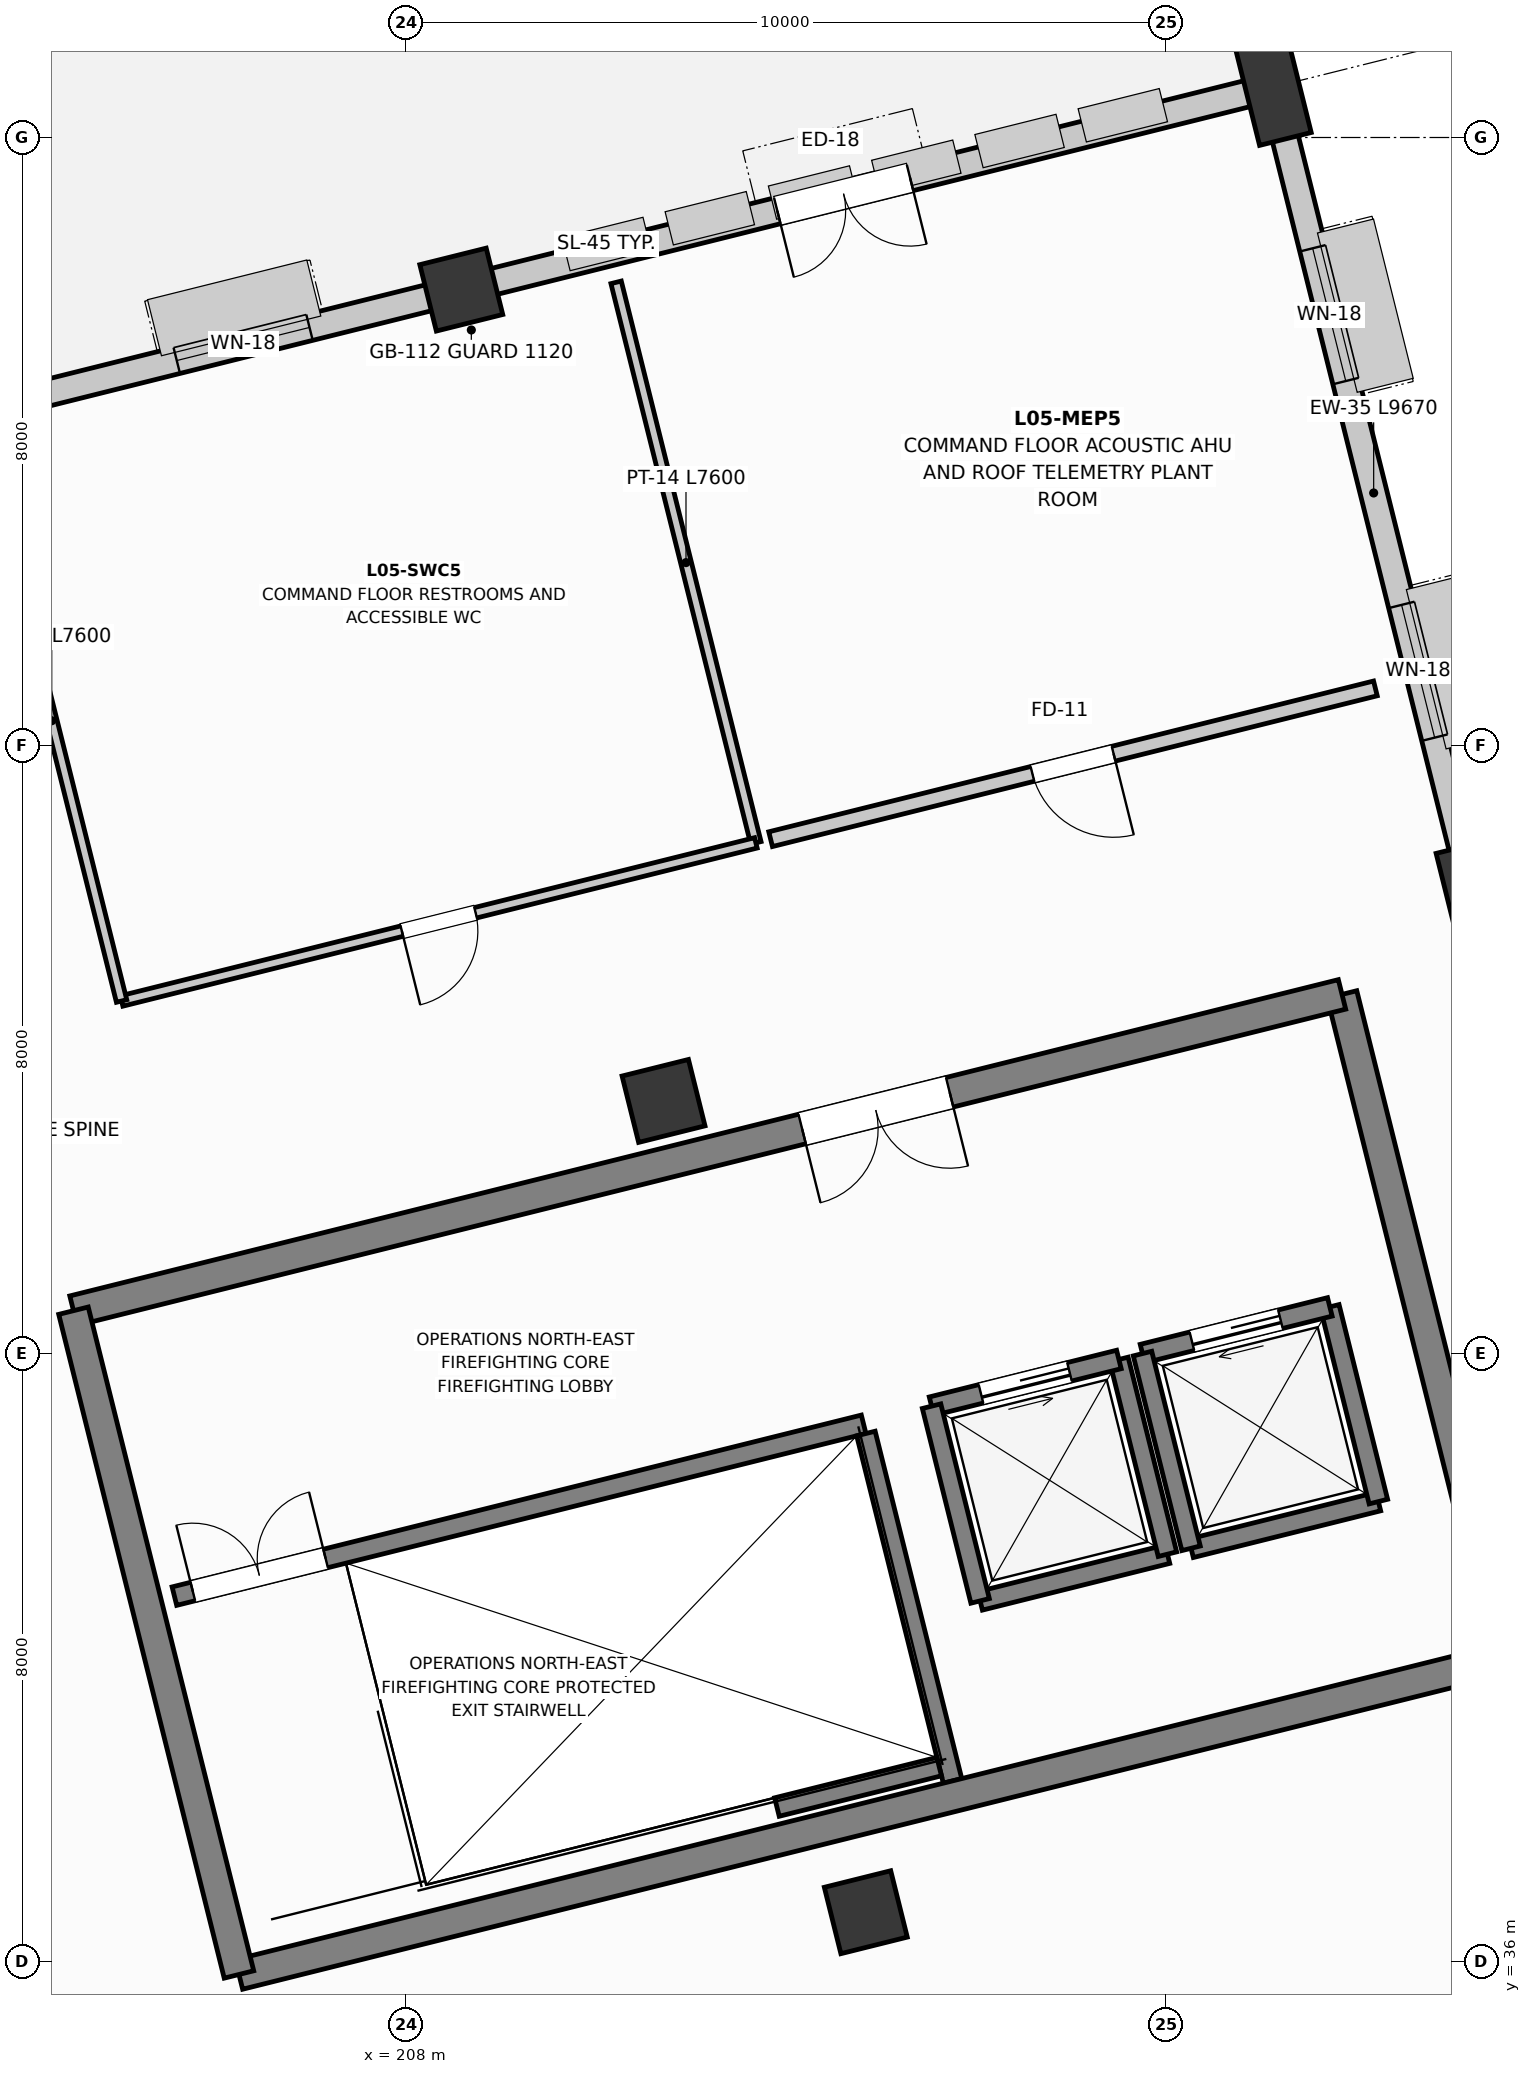
"""IFC4 building model, lengths in metres.
Left out: names, types, materials, properties, quantities, classifications, styles, units other than length and angle.
Written with IfcOpenShell. Run it as: python <this file> out.ifc"""

import sys

from ifc_helpers import new_model, si_unit, direction, frame, frame_2d, origin, origin_2d, place, context, subcontext, project, spatial, rectangle, extrude, element, fill, save


model = new_model("IFC4")
c1 = context("Model", 3, precision=1e-05, world=origin(), true_north=direction((0.0, 1.0)))
c2 = subcontext(c1, "Body", "Model", "MODEL_VIEW")
j1 = project(units=[si_unit("LENGTHUNIT", "METRE"), si_unit("PLANEANGLEUNIT", "RADIAN")], contexts=[c1])
p1 = place(None, origin())
s1 = spatial("IfcSite", under=j1, at=p1, CompositionType="ELEMENT")
p2 = place(p1, origin())
s2 = spatial("IfcBuilding", under=s1, at=p2, CompositionType="ELEMENT")
p3 = place(p2, frame((0.0, 0.0, 24.6)))
s3 = spatial("IfcBuildingStorey", under=s2, at=p3, CompositionType="ELEMENT", Elevation=24.6)
for number, where, z_axis, x_axis in (
    (1, (214.044, 36.652, 0.0), (0.0, 0.0, 1.0), (0.97, 0.242, 0.0)),
    (2, (211.383, 47.325, 0.0), (0.0, 0.0, 1.0), (0.97, 0.242, 0.0)),
    (3, (208.722, 57.999, 0.0), (0.0, 0.0, 1.0), (0.97, 0.242, 0.0)),
):
    element("IfcColumn", number, at=place(p3, frame(where, z_axis=z_axis, x_axis=x_axis)), inside=s3, PredefinedType="COLUMN", context=c2, shape_type="SweptSolid", body=[
        extrude(rectangle(XDim=0.9, YDim=0.9, at=origin_2d()), origin(), (0.0, 0.0, 1.0), 4.2),
    ])
for number, where, z_axis, x_axis in (
    (4, (222.056, 49.987, 0.0), (0.0, 0.0, 1.0), (0.97, 0.242, 0.0)),
    (5, (219.395, 60.66, 0.0), (0.0, 0.0, 1.0), (0.97, 0.242, 0.0)),
):
    element("IfcColumn", number, at=place(p3, frame(where, z_axis=z_axis, x_axis=x_axis)), inside=s3, PredefinedType="COLUMN", context=c2, shape_type="SweptSolid", body=[
        extrude(rectangle(XDim=0.7, YDim=1.4, at=origin_2d()), origin(), (0.0, 0.0, 1.0), 4.2),
    ])
p4 = place(p3, frame((221.895, 50.632, 0.0), z_axis=(0.0, 0.0, 1.0), x_axis=(-0.241910213289, 0.970298638929, 0.0)))
e6 = element("IfcWall", 6, at=p4, inside=s3, PredefinedType="STANDARD", context=c2, shape_type="SweptSolid", body=[
    extrude(rectangle(XDim=9.67, YDim=0.35, at=frame_2d((4.835, 0.0))), origin(), (0.0, 0.0, 1.0), 3.575),
])
p5 = place(p4, frame((1.517, 0.0, 0.85)))
e7 = element("IfcOpeningElement", 7, at=p5, cuts=e6, PredefinedType="OPENING", context=c2, shape_type="SweptSolid", body=[
    extrude(rectangle(XDim=1.8, YDim=1.65, at=frame_2d((0.9, 0.825))), frame((0.0, 0.185, 0.0), z_axis=(0.0, -1.0, 0.0), x_axis=(1.0, 0.0, 0.0)), (0.0, 0.0, 1.0), 0.37),
])
p6 = place(p4, frame((6.352, 0.0, 0.85)))
e8 = element("IfcOpeningElement", 8, at=p6, cuts=e6, PredefinedType="OPENING", context=c2, shape_type="SweptSolid", body=[
    extrude(rectangle(XDim=1.8, YDim=1.65, at=frame_2d((0.9, 0.825))), frame((0.0, 0.185, 0.0), z_axis=(0.0, -1.0, 0.0), x_axis=(1.0, 0.0, 0.0)), (0.0, 0.0, 1.0), 0.37),
])
p7 = place(p3, frame((219.089, 60.584, 0.0), z_axis=(0.0, 0.0, 1.0), x_axis=(-0.970295240562, -0.241923843686, 0.0)))
e9 = element("IfcWall", 9, at=p7, inside=s3, PredefinedType="STANDARD", context=c2, shape_type="SweptSolid", body=[
    extrude(rectangle(XDim=10.27, YDim=0.35, at=frame_2d((5.135, 0.0))), origin(), (0.0, 0.0, 1.0), 3.575),
])
p8 = place(p7, frame((4.6, 0.0, 0.0)))
e10 = element("IfcOpeningElement", 10, at=p8, cuts=e9, PredefinedType="OPENING", context=c2, shape_type="SweptSolid", body=[
    extrude(rectangle(XDim=1.8, YDim=2.3, at=frame_2d((0.9, 1.15))), frame((0.0, 0.185, 0.0), z_axis=(0.0, -1.0, 0.0), x_axis=(1.0, 0.0, 0.0)), (0.0, 0.0, 1.0), 0.37),
])
p9 = place(p3, frame((208.319, 57.898, 0.0), z_axis=(0.0, 0.0, 1.0), x_axis=(-0.970296149297, -0.241920198949, 0.0)))
e11 = element("IfcWall", 11, at=p9, inside=s3, PredefinedType="STANDARD", context=c2, shape_type="SweptSolid", body=[
    extrude(rectangle(XDim=10.171, YDim=0.35, at=frame_2d((5.085, 0.0))), origin(), (0.0, 0.0, 1.0), 3.575),
])
p10 = place(p9, frame((1.643, 0.0, 0.85)))
e12 = element("IfcOpeningElement", 12, at=p10, cuts=e11, PredefinedType="OPENING", context=c2, shape_type="SweptSolid", body=[
    extrude(rectangle(XDim=1.8, YDim=1.65, at=frame_2d((0.9, 0.825))), frame((0.0, 0.185, 0.0), z_axis=(0.0, -1.0, 0.0), x_axis=(1.0, 0.0, 0.0)), (0.0, 0.0, 1.0), 0.37),
])
p11 = place(p9, frame((6.728, 0.0, 0.85)))
e13 = element("IfcOpeningElement", 13, at=p11, cuts=e11, PredefinedType="OPENING", context=c2, shape_type="SweptSolid", body=[
    extrude(rectangle(XDim=1.8, YDim=1.65, at=frame_2d((0.9, 0.825))), frame((0.0, 0.185, 0.0), z_axis=(0.0, -1.0, 0.0), x_axis=(1.0, 0.0, 0.0)), (0.0, 0.0, 1.0), 0.37),
])
p12 = place(p3, frame((200.81, 44.261, 0.0), z_axis=(0.0, 0.0, 1.0), x_axis=(0.241915507725, -0.97029731893, 0.0)))
e14 = element("IfcWall", 14, at=p12, inside=s3, PredefinedType="STANDARD", context=c2, shape_type="SweptSolid", body=[
    extrude(rectangle(XDim=10.17, YDim=0.35, at=frame_2d((5.085, 0.0))), origin(), (0.0, 0.0, 1.0), 3.225),
])
p13 = place(p12, frame((1.642, 0.0, 0.85)))
e15 = element("IfcOpeningElement", 15, at=p13, cuts=e14, PredefinedType="OPENING", context=c2, shape_type="SweptSolid", body=[
    extrude(rectangle(XDim=1.8, YDim=1.65, at=frame_2d((0.9, 0.825))), frame((0.0, 0.185, 0.0), z_axis=(0.0, -1.0, 0.0), x_axis=(1.0, 0.0, 0.0)), (0.0, 0.0, 1.0), 0.37),
])
p14 = place(p12, frame((6.727, 0.0, 0.85)))
e16 = element("IfcOpeningElement", 16, at=p14, cuts=e14, PredefinedType="OPENING", context=c2, shape_type="SweptSolid", body=[
    extrude(rectangle(XDim=1.8, YDim=1.65, at=frame_2d((0.9, 0.825))), frame((0.0, 0.185, 0.0), z_axis=(0.0, -1.0, 0.0), x_axis=(1.0, 0.0, 0.0)), (0.0, 0.0, 1.0), 0.37),
])
p15 = place(p3, frame((215.548, 40.748, 0.0), z_axis=(0.0, 0.0, 1.0), x_axis=(0.97029284861, 0.241933436994, 0.0)))
e17 = element("IfcWall", 17, at=p15, inside=s3, PredefinedType="SOLIDWALL", context=c2, shape_type="SweptSolid", body=[
    extrude(rectangle(XDim=2.54, YDim=0.25, at=frame_2d((1.27, 0.0))), origin(), (0.0, 0.0, 1.0), 3.98),
])
p16 = place(p3, frame((218.012, 41.362, 0.0), z_axis=(0.0, 0.0, 1.0), x_axis=(-0.241938414856, 0.970291607413, 0.0)))
e18 = element("IfcWall", 18, at=p16, inside=s3, PredefinedType="SOLIDWALL", context=c2, shape_type="SweptSolid", body=[
    extrude(rectangle(XDim=2.64, YDim=0.25, at=frame_2d((1.32, 0.0))), origin(), (0.0, 0.0, 1.0), 3.98),
])
p17 = place(p3, frame((217.374, 43.924, 0.0), z_axis=(0.0, 0.0, 1.0), x_axis=(-0.97029284861, -0.241933436994, 0.0)))
e19 = element("IfcWall", 19, at=p17, inside=s3, PredefinedType="SOLIDWALL", context=c2, shape_type="SweptSolid", body=[
    extrude(rectangle(XDim=2.54, YDim=0.25, at=frame_2d((1.27, 0.0))), origin(), (0.0, 0.0, 1.0), 3.98),
])
p18 = place(p17, frame((0.67, 0.0, 0.0)))
e20 = element("IfcOpeningElement", 20, at=p18, cuts=e19, PredefinedType="OPENING", context=c2, shape_type="SweptSolid", body=[
    extrude(rectangle(XDim=1.2, YDim=2.2, at=frame_2d((0.6, 1.1))), frame((0.0, 0.135, 0.0), z_axis=(0.0, -1.0, 0.0), x_axis=(1.0, 0.0, 0.0)), (0.0, 0.0, 1.0), 0.27),
])
p19 = place(p3, frame((214.909, 43.309, 0.0), z_axis=(0.0, 0.0, 1.0), x_axis=(0.241938414856, -0.970291607413, 0.0)))
e21 = element("IfcWall", 21, at=p19, inside=s3, PredefinedType="SOLIDWALL", context=c2, shape_type="SweptSolid", body=[
    extrude(rectangle(XDim=2.64, YDim=0.25, at=frame_2d((1.32, 0.0))), origin(), (0.0, 0.0, 1.0), 3.98),
])
p20 = place(p3, frame((218.323, 41.44, 0.0), z_axis=(0.0, 0.0, 1.0), x_axis=(0.97029284861, 0.241933436994, 0.0)))
e22 = element("IfcWall", 22, at=p20, inside=s3, PredefinedType="SOLIDWALL", context=c2, shape_type="SweptSolid", body=[
    extrude(rectangle(XDim=2.54, YDim=0.25, at=frame_2d((1.27, 0.0))), origin(), (0.0, 0.0, 1.0), 3.98),
])
p21 = place(p3, frame((220.787, 42.054, 0.0), z_axis=(0.0, 0.0, 1.0), x_axis=(-0.241938414856, 0.970291607413, 0.0)))
e23 = element("IfcWall", 23, at=p21, inside=s3, PredefinedType="SOLIDWALL", context=c2, shape_type="SweptSolid", body=[
    extrude(rectangle(XDim=2.64, YDim=0.25, at=frame_2d((1.32, 0.0))), origin(), (0.0, 0.0, 1.0), 3.98),
])
p22 = place(p3, frame((220.149, 44.616, 0.0), z_axis=(0.0, 0.0, 1.0), x_axis=(-0.97029284861, -0.241933436994, 0.0)))
e24 = element("IfcWall", 24, at=p22, inside=s3, PredefinedType="SOLIDWALL", context=c2, shape_type="SweptSolid", body=[
    extrude(rectangle(XDim=2.54, YDim=0.25, at=frame_2d((1.27, 0.0))), origin(), (0.0, 0.0, 1.0), 3.98),
])
p23 = place(p22, frame((0.67, 0.0, 0.0)))
e25 = element("IfcOpeningElement", 25, at=p23, cuts=e24, PredefinedType="OPENING", context=c2, shape_type="SweptSolid", body=[
    extrude(rectangle(XDim=1.2, YDim=2.2, at=frame_2d((0.6, 1.1))), frame((0.0, 0.135, 0.0), z_axis=(0.0, -1.0, 0.0), x_axis=(1.0, 0.0, 0.0)), (0.0, 0.0, 1.0), 0.27),
])
p24 = place(p3, frame((217.684, 44.001, 0.0), z_axis=(0.0, 0.0, 1.0), x_axis=(0.241938414856, -0.970291607413, 0.0)))
e26 = element("IfcWall", 26, at=p24, inside=s3, PredefinedType="SOLIDWALL", context=c2, shape_type="SweptSolid", body=[
    extrude(rectangle(XDim=2.64, YDim=0.25, at=frame_2d((1.32, 0.0))), origin(), (0.0, 0.0, 1.0), 3.98),
])
p25 = place(p3, frame((204.948, 40.81, 0.0), z_axis=(0.0, 0.0, 1.0), x_axis=(0.970297151331, 0.241916179943, 0.0)))
e27 = element("IfcWall", 27, at=p25, inside=s3, PredefinedType="SOLIDWALL", context=c2, shape_type="SweptSolid", body=[
    extrude(rectangle(XDim=9.345, YDim=0.25, at=frame_2d((4.673, 0.0))), origin(), (0.0, 0.0, 1.0), 3.98),
])
p26 = place(p25, frame((0.25, 0.0, 0.0)))
e28 = element("IfcOpeningElement", 28, at=p26, cuts=e27, PredefinedType="OPENING", context=c2, shape_type="SweptSolid", body=[
    extrude(rectangle(XDim=1.8, YDim=2.25, at=frame_2d((0.9, 1.125))), frame((0.0, 0.135, 0.0), z_axis=(0.0, -1.0, 0.0), x_axis=(1.0, 0.0, 0.0)), (0.0, 0.0, 1.0), 0.27),
])
p27 = place(p3, frame((215.185, 38.38, 0.0), z_axis=(0.0, 0.0, 1.0), x_axis=(-0.241911120435, 0.970298412763, 0.0)))
e29 = element("IfcWall", 29, at=p27, inside=s3, PredefinedType="SOLIDWALL", context=c2, shape_type="SweptSolid", body=[
    extrude(rectangle(XDim=4.71, YDim=0.25, at=frame_2d((2.355, 0.0))), origin(), (0.0, 0.0, 1.0), 3.98),
])
p28 = place(p3, frame((212.875, 38.035, 0.0), z_axis=(0.0, 0.0, 1.0), x_axis=(0.97029738597, 0.241915238833, 0.0)))
e30 = element("IfcWall", 30, at=p28, inside=s3, PredefinedType="SOLIDWALL", context=c2, shape_type="SweptSolid", body=[
    extrude(rectangle(XDim=2.2, YDim=0.25, at=frame_2d((1.1, 0.0))), origin(), (0.0, 0.0, 1.0), 3.98),
])
p29 = place(p3, frame((205.797, 35.833, 0.0), z_axis=(0.0, 0.0, 1.0), x_axis=(0.970295179998, 0.241924086589, 0.0)))
e31 = element("IfcWall", 31, at=p29, inside=s3, PredefinedType="SHEAR", context=c2, shape_type="SweptSolid", body=[
    extrude(rectangle(XDim=17.2, YDim=0.4, at=frame_2d((8.6, 0.0))), origin(), (0.0, 0.0, 1.0), 3.98),
])
p30 = place(p3, frame((222.486, 39.994, 0.0), z_axis=(0.0, 0.0, 1.0), x_axis=(-0.241923808098, 0.970295249435, 0.0)))
e32 = element("IfcWall", 32, at=p30, inside=s3, PredefinedType="SHEAR", context=c2, shape_type="SweptSolid", body=[
    extrude(rectangle(XDim=9.0, YDim=0.4, at=frame_2d((4.5, 0.0))), origin(), (0.0, 0.0, 1.0), 3.98),
])
p31 = place(p3, frame((220.309, 48.727, 0.0), z_axis=(0.0, 0.0, 1.0), x_axis=(-0.970296544738, -0.241918612906, 0.0)))
e33 = element("IfcWall", 33, at=p31, inside=s3, PredefinedType="SHEAR", context=c2, shape_type="SweptSolid", body=[
    extrude(rectangle(XDim=17.2, YDim=0.4, at=frame_2d((8.6, 0.0))), origin(), (0.0, 0.0, 1.0), 3.98),
])
p32 = place(p31, frame((5.32, 0.0, 0.0)))
e34 = element("IfcOpeningElement", 34, at=p32, cuts=e33, PredefinedType="OPENING", context=c2, shape_type="SweptSolid", body=[
    extrude(rectangle(XDim=2.0, YDim=2.3, at=frame_2d((1.0, 1.15))), frame((0.0, 0.21, 0.0), z_axis=(0.0, -1.0, 0.0), x_axis=(1.0, 0.0, 0.0)), (0.0, 0.0, 1.0), 0.42),
])
p33 = place(p3, frame((203.62, 44.566, 0.0), z_axis=(0.0, 0.0, 1.0), x_axis=(0.241921199913, -0.97029589973, 0.0)))
e35 = element("IfcWall", 35, at=p33, inside=s3, PredefinedType="SHEAR", context=c2, shape_type="SweptSolid", body=[
    extrude(rectangle(XDim=9.0, YDim=0.4, at=frame_2d((4.5, 0.0))), origin(), (0.0, 0.0, 1.0), 3.98),
])
p34 = place(p3, frame((210.759, 58.094, 0.0), z_axis=(0.0, 0.0, 1.0), x_axis=(0.241922569678, -0.970295558209, 0.0)))
e36 = element("IfcWall", 36, at=p34, inside=s3, PredefinedType="PARTITIONING", context=c2, shape_type="SweptSolid", body=[
    extrude(rectangle(XDim=7.6, YDim=0.14, at=frame_2d((3.8, 0.0))), origin(), (0.0, 0.0, 1.0), 3.98),
])
p35 = place(p3, frame((212.598, 50.72, 0.0), z_axis=(0.0, 0.0, 1.0), x_axis=(-0.970296884994, -0.241917248188, 0.0)))
e37 = element("IfcWall", 37, at=p35, inside=s3, PredefinedType="PARTITIONING", context=c2, shape_type="SweptSolid", body=[
    extrude(rectangle(XDim=8.6, YDim=0.14, at=frame_2d((4.3, 0.0))), origin(), (0.0, 0.0, 1.0), 3.225),
])
p36 = place(p35, frame((3.8, 0.0, 0.0)))
e38 = element("IfcOpeningElement", 38, at=p36, cuts=e37, PredefinedType="OPENING", context=c2, shape_type="SweptSolid", body=[
    extrude(rectangle(XDim=1.0, YDim=2.15, at=frame_2d((0.5, 1.075))), frame((0.0, 0.08, 0.0), z_axis=(0.0, -1.0, 0.0), x_axis=(1.0, 0.0, 0.0)), (0.0, 0.0, 1.0), 0.16),
])
p37 = place(p3, frame((204.253, 48.64, 0.0), z_axis=(0.0, 0.0, 1.0), x_axis=(-0.241922569678, 0.970295558209, 0.0)))
e39 = element("IfcWall", 39, at=p37, inside=s3, PredefinedType="PARTITIONING", context=c2, shape_type="SweptSolid", body=[
    extrude(rectangle(XDim=7.6, YDim=0.14, at=frame_2d((3.8, 0.0))), origin(), (0.0, 0.0, 1.0), 3.98),
])
p38 = place(p3, frame((220.748, 52.752, 0.0), z_axis=(0.0, 0.0, 1.0), x_axis=(-0.97029796636, -0.241912910937, 0.0)))
e40 = element("IfcWall", 40, at=p38, inside=s3, PredefinedType="PARTITIONING", context=c2, shape_type="SweptSolid", body=[
    extrude(rectangle(XDim=8.2, YDim=0.2, at=frame_2d((4.1, 0.0))), origin(), (0.0, 0.0, 1.0), 3.98),
])
p39 = place(p38, frame((3.55, 0.0, 0.0)))
e41 = element("IfcOpeningElement", 41, at=p39, cuts=e40, PredefinedType="OPENING", context=c2, shape_type="SweptSolid", body=[
    extrude(rectangle(XDim=1.1, YDim=2.2, at=frame_2d((0.55, 1.1))), frame((0.0, 0.11, 0.0), z_axis=(0.0, -1.0, 0.0), x_axis=(1.0, 0.0, 0.0)), (0.0, 0.0, 1.0), 0.22),
])
p40 = place(p5, origin())
e42 = element("IfcWindow", 42, at=p40, inside=s3, PartitioningType="SINGLE_PANEL", PredefinedType="WINDOW", context=c2, shape_type="SweptSolid", body=[
    extrude(rectangle(XDim=1.8, YDim=1.65, at=frame_2d((0.9, 0.825))), frame((0.0, 0.03, 0.0), z_axis=(0.0, -1.0, 0.0), x_axis=(1.0, 0.0, 0.0)), (0.0, 0.0, 1.0), 0.06),
])
fill(e7, e42)
p41 = place(p6, origin())
e43 = element("IfcWindow", 43, at=p41, inside=s3, PartitioningType="SINGLE_PANEL", PredefinedType="WINDOW", context=c2, shape_type="SweptSolid", body=[
    extrude(rectangle(XDim=1.8, YDim=1.65, at=frame_2d((0.9, 0.825))), frame((0.0, 0.03, 0.0), z_axis=(0.0, -1.0, 0.0), x_axis=(1.0, 0.0, 0.0)), (0.0, 0.0, 1.0), 0.06),
])
fill(e8, e43)
p42 = place(p8, origin())
e44 = element("IfcDoor", 44, at=p42, inside=s3, OperationType="DOUBLE_DOOR_SINGLE_SWING", PredefinedType="DOOR", context=c2, shape_type="SweptSolid", body=[
    extrude(rectangle(XDim=1.8, YDim=2.3, at=frame_2d((0.9, 1.15))), frame((0.0, 0.025, 0.0), z_axis=(0.0, -1.0, 0.0), x_axis=(1.0, 0.0, 0.0)), (0.0, 0.0, 1.0), 0.05),
])
fill(e10, e44)
p43 = place(p10, origin())
e45 = element("IfcWindow", 45, at=p43, inside=s3, PartitioningType="SINGLE_PANEL", PredefinedType="WINDOW", context=c2, shape_type="SweptSolid", body=[
    extrude(rectangle(XDim=1.8, YDim=1.65, at=frame_2d((0.9, 0.825))), frame((0.0, 0.03, 0.0), z_axis=(0.0, -1.0, 0.0), x_axis=(1.0, 0.0, 0.0)), (0.0, 0.0, 1.0), 0.06),
])
fill(e12, e45)
p44 = place(p18, origin())
e46 = element("IfcDoor", 46, at=p44, inside=s3, OperationType="SLIDING_TO_LEFT", PredefinedType="DOOR", context=c2, shape_type="SweptSolid", body=[
    extrude(rectangle(XDim=1.2, YDim=2.2, at=frame_2d((0.6, 1.1))), frame((0.0, 0.025, 0.0), z_axis=(0.0, -1.0, 0.0), x_axis=(1.0, 0.0, 0.0)), (0.0, 0.0, 1.0), 0.05),
])
fill(e20, e46)
p45 = place(p23, origin())
e47 = element("IfcDoor", 47, at=p45, inside=s3, OperationType="SLIDING_TO_RIGHT", PredefinedType="DOOR", context=c2, shape_type="SweptSolid", body=[
    extrude(rectangle(XDim=1.2, YDim=2.2, at=frame_2d((0.6, 1.1))), frame((0.0, 0.025, 0.0), z_axis=(0.0, -1.0, 0.0), x_axis=(1.0, 0.0, 0.0)), (0.0, 0.0, 1.0), 0.05),
])
fill(e25, e47)
p46 = place(p26, origin())
e48 = element("IfcDoor", 48, at=p46, inside=s3, OperationType="DOUBLE_DOOR_SINGLE_SWING", PredefinedType="DOOR", context=c2, shape_type="SweptSolid", body=[
    extrude(rectangle(XDim=1.8, YDim=2.25, at=frame_2d((0.9, 1.125))), frame((0.0, 0.025, 0.0), z_axis=(0.0, -1.0, 0.0), x_axis=(1.0, 0.0, 0.0)), (0.0, 0.0, 1.0), 0.05),
])
fill(e28, e48)
p47 = place(p32, origin())
e49 = element("IfcDoor", 49, at=p47, inside=s3, OperationType="DOUBLE_DOOR_SINGLE_SWING", PredefinedType="DOOR", context=c2, shape_type="SweptSolid", body=[
    extrude(rectangle(XDim=2.0, YDim=2.3, at=frame_2d((1.0, 1.15))), frame((0.0, 0.025, 0.0), z_axis=(0.0, -1.0, 0.0), x_axis=(1.0, 0.0, 0.0)), (0.0, 0.0, 1.0), 0.05),
])
fill(e34, e49)
p48 = place(p36, origin())
e50 = element("IfcDoor", 50, at=p48, inside=s3, OperationType="SINGLE_SWING_RIGHT", PredefinedType="DOOR", context=c2, shape_type="SweptSolid", body=[
    extrude(rectangle(XDim=1.0, YDim=2.15, at=frame_2d((0.5, 1.075))), frame((0.0, 0.025, 0.0), z_axis=(0.0, -1.0, 0.0), x_axis=(1.0, 0.0, 0.0)), (0.0, 0.0, 1.0), 0.05),
])
fill(e38, e50)
p49 = place(p39, origin())
e51 = element("IfcDoor", 51, at=p49, inside=s3, OperationType="SINGLE_SWING_LEFT", PredefinedType="DOOR", context=c2, shape_type="SweptSolid", body=[
    extrude(rectangle(XDim=1.1, YDim=2.2, at=frame_2d((0.55, 1.1))), frame((0.0, 0.025, 0.0), z_axis=(0.0, -1.0, 0.0), x_axis=(1.0, 0.0, 0.0)), (0.0, 0.0, 1.0), 0.05),
])
fill(e41, e51)
save(model, sys.argv[1])
